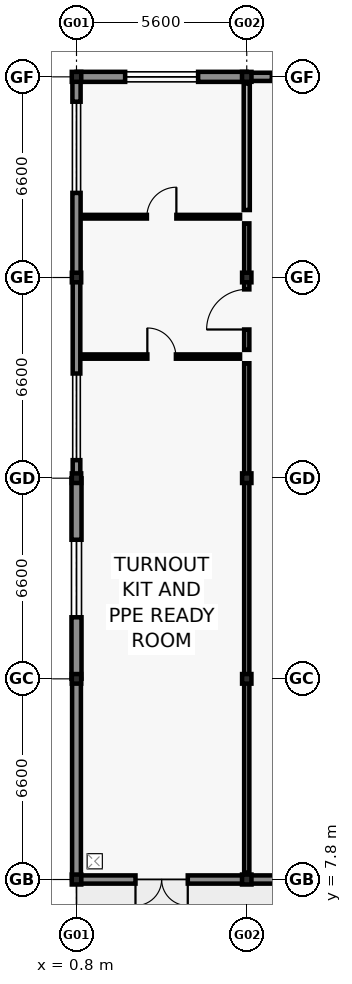
"""IFC4 building model, lengths in metres.
Left out: names, types, materials, properties, quantities, classifications, styles, units other than length and angle.
Written with IfcOpenShell. Run it as: python <this file> out.ifc"""

import sys

from ifc_helpers import new_model, si_unit, direction, frame, frame_2d, origin, origin_2d, place, context, subcontext, project, spatial, rectangle, i_section, extrude, element, fill, save


model = new_model("IFC4")
c1 = context("Model", 3, precision=1e-05, world=origin(), true_north=direction((0.0, 1.0)))
c2 = subcontext(c1, "Body", "Model", "MODEL_VIEW")
j1 = project(units=[si_unit("LENGTHUNIT", "METRE"), si_unit("PLANEANGLEUNIT", "RADIAN")], contexts=[c1])
p1 = place(None, origin())
s1 = spatial("IfcSite", under=j1, at=p1, CompositionType="ELEMENT")
p2 = place(p1, origin())
s2 = spatial("IfcBuilding", under=s1, at=p2, CompositionType="ELEMENT")
p3 = place(p2, origin())
s3 = spatial("IfcBuildingStorey", under=s2, at=p3, CompositionType="ELEMENT", Elevation=0.0)
p4 = place(p3, frame((0.8, 7.8, 0.0), z_axis=(0.0, 0.0, 1.0), x_axis=(1.0, 0.0, 0.0)))
e1 = element("IfcColumn", 1, at=p4, inside=s3, PredefinedType="COLUMN", context=c2, shape_type="SweptSolid", body=[
    extrude(i_section(OverallWidth=0.311, OverallDepth=0.327, WebThickness=0.016, FlangeThickness=0.025, FilletRadius=0.017, at=origin_2d()), origin(), (0.0, 0.0, 1.0), 5.4),
])
for number, where, z_axis, x_axis in (
    (2, (0.8, 14.4, 0.0), (0.0, 0.0, 1.0), (1.0, 0.0, 0.0)),
    (3, (0.8, 21.0, 0.0), (0.0, 0.0, 1.0), (1.0, 0.0, 0.0)),
    (4, (0.8, 27.6, 0.0), (0.0, 0.0, 1.0), (1.0, 0.0, 0.0)),
):
    element("IfcColumn", number, at=place(p3, frame(where, z_axis=z_axis, x_axis=x_axis)), inside=s3, PredefinedType="COLUMN", context=c2, shape_type="SweptSolid", body=[
        extrude(i_section(OverallWidth=0.307, OverallDepth=0.315, WebThickness=0.012, FlangeThickness=0.019, FilletRadius=0.017, at=origin_2d()), origin(), (0.0, 0.0, 1.0), 5.4),
    ])
for number, where, z_axis, x_axis in (
    (5, (0.8, 34.2, 0.0), (0.0, 0.0, 1.0), (1.0, 0.0, 0.0)),
    (6, (6.4, 7.8, 0.0), (0.0, 0.0, 1.0), (1.0, 0.0, 0.0)),
):
    element("IfcColumn", number, at=place(p3, frame(where, z_axis=z_axis, x_axis=x_axis)), inside=s3, PredefinedType="COLUMN", context=c2, shape_type="SweptSolid", body=[
        extrude(i_section(OverallWidth=0.311, OverallDepth=0.327, WebThickness=0.016, FlangeThickness=0.025, FilletRadius=0.017, at=origin_2d()), origin(), (0.0, 0.0, 1.0), 5.4),
    ])
for number, where, z_axis, x_axis in (
    (7, (6.4, 14.4, 0.0), (0.0, 0.0, 1.0), (1.0, 0.0, 0.0)),
    (8, (6.4, 21.0, 0.0), (0.0, 0.0, 1.0), (1.0, 0.0, 0.0)),
    (9, (6.4, 27.6, 0.0), (0.0, 0.0, 1.0), (1.0, 0.0, 0.0)),
):
    element("IfcColumn", number, at=place(p3, frame(where, z_axis=z_axis, x_axis=x_axis)), inside=s3, PredefinedType="COLUMN", context=c2, shape_type="SweptSolid", body=[
        extrude(i_section(OverallWidth=0.307, OverallDepth=0.315, WebThickness=0.012, FlangeThickness=0.019, FilletRadius=0.017, at=origin_2d()), origin(), (0.0, 0.0, 1.0), 5.4),
    ])
p5 = place(p3, frame((6.4, 34.2, 0.0), z_axis=(0.0, 0.0, 1.0), x_axis=(1.0, 0.0, 0.0)))
e10 = element("IfcColumn", 10, at=p5, inside=s3, PredefinedType="COLUMN", context=c2, shape_type="SweptSolid", body=[
    extrude(i_section(OverallWidth=0.311, OverallDepth=0.327, WebThickness=0.016, FlangeThickness=0.025, FilletRadius=0.017, at=origin_2d()), origin(), (0.0, 0.0, 1.0), 5.4),
])
p6 = place(p3, frame((6.395, 7.8, 0.0), z_axis=(0.0, 0.0, 1.0), x_axis=(-1.0, 0.0, 0.0)))
e11 = element("IfcWall", 11, at=p6, inside=s3, PredefinedType="SOLIDWALL", context=c2, shape_type="SweptSolid", body=[
    extrude(rectangle(XDim=5.59, YDim=0.27, at=frame_2d((2.795, 0.0))), origin(), (0.0, 0.0, 1.0), 4.52),
])
p7 = place(p6, frame((1.935, 0.0, 0.0)))
e12 = element("IfcOpeningElement", 12, at=p7, cuts=e11, PredefinedType="OPENING", context=c2, shape_type="SweptSolid", body=[
    extrude(rectangle(XDim=1.72, YDim=2.2, at=frame_2d((0.86, 1.1))), frame((0.0, 0.145, 0.0), z_axis=(0.0, -1.0, 0.0), x_axis=(1.0, 0.0, 0.0)), (0.0, 0.0, 1.0), 0.29),
])
p8 = place(p3, frame((11.995, 7.8, 0.0), z_axis=(0.0, 0.0, 1.0), x_axis=(-1.0, 0.0, 0.0)))
e13 = element("IfcWall", 13, at=p8, inside=s3, PredefinedType="SOLIDWALL", context=c2, shape_type="SweptSolid", body=[
    extrude(rectangle(XDim=5.59, YDim=0.27, at=frame_2d((2.795, 0.0))), origin(), (0.0, 0.0, 1.0), 4.3),
])
p9 = place(p8, frame((0.97, 0.0, 0.0)))
e14 = element("IfcOpeningElement", 14, at=p9, cuts=e13, PredefinedType="OPENING", context=c2, shape_type="SweptSolid", body=[
    extrude(rectangle(XDim=3.65, YDim=4.15, at=frame_2d((1.825, 2.075))), frame((0.0, 0.145, 0.0), z_axis=(0.0, -1.0, 0.0), x_axis=(1.0, 0.0, 0.0)), (0.0, 0.0, 1.0), 0.29),
])
p10 = place(p3, frame((0.805, 34.2, 0.0), z_axis=(0.0, 0.0, 1.0), x_axis=(1.0, 0.0, 0.0)))
e15 = element("IfcWall", 15, at=p10, inside=s3, PredefinedType="SOLIDWALL", context=c2, shape_type="SweptSolid", body=[
    extrude(rectangle(XDim=5.59, YDim=0.33, at=frame_2d((2.795, 0.0))), origin(), (0.0, 0.0, 1.0), 4.52),
])
p11 = place(p10, frame((1.595, 0.0, 0.8)))
e16 = element("IfcOpeningElement", 16, at=p11, cuts=e15, PredefinedType="OPENING", context=c2, shape_type="SweptSolid", body=[
    extrude(rectangle(XDim=2.4, YDim=2.1, at=frame_2d((1.2, 1.05))), frame((0.0, 0.175, 0.0), z_axis=(0.0, -1.0, 0.0), x_axis=(1.0, 0.0, 0.0)), (0.0, 0.0, 1.0), 0.35),
])
p12 = place(p3, frame((6.405, 34.2, 0.0), z_axis=(0.0, 0.0, 1.0), x_axis=(1.0, 0.0, 0.0)))
e17 = element("IfcWall", 17, at=p12, inside=s3, PredefinedType="SOLIDWALL", context=c2, shape_type="SweptSolid", body=[
    extrude(rectangle(XDim=5.59, YDim=0.27, at=frame_2d((2.795, 0.0))), origin(), (0.0, 0.0, 1.0), 4.3),
])
p13 = place(p12, frame((0.82, 0.0, 0.0)))
e18 = element("IfcOpeningElement", 18, at=p13, cuts=e17, PredefinedType="OPENING", context=c2, shape_type="SweptSolid", body=[
    extrude(rectangle(XDim=3.95, YDim=4.2, at=frame_2d((1.975, 2.1))), frame((0.0, 0.145, 0.0), z_axis=(0.0, -1.0, 0.0), x_axis=(1.0, 0.0, 0.0)), (0.0, 0.0, 1.0), 0.29),
])
p14 = place(p3, frame((0.8, 7.805, 0.0), z_axis=(0.0, 0.0, 1.0), x_axis=(0.0, 1.0, 0.0)))
e19 = element("IfcWall", 19, at=p14, inside=s3, PredefinedType="SOLIDWALL", context=c2, shape_type="SweptSolid", body=[
    extrude(rectangle(XDim=6.59, YDim=0.29, at=frame_2d((3.295, 0.0))), origin(), (0.0, 0.0, 1.0), 4.52),
])
p15 = place(p3, frame((0.8, 14.405, 0.0), z_axis=(0.0, 0.0, 1.0), x_axis=(0.0, 1.0, 0.0)))
e20 = element("IfcWall", 20, at=p15, inside=s3, PredefinedType="SOLIDWALL", context=c2, shape_type="SweptSolid", body=[
    extrude(rectangle(XDim=6.59, YDim=0.33, at=frame_2d((3.295, 0.0))), origin(), (0.0, 0.0, 1.0), 4.52),
])
p16 = place(p15, frame((2.02, 0.0, 0.8)))
e21 = element("IfcOpeningElement", 21, at=p16, cuts=e20, PredefinedType="OPENING", context=c2, shape_type="SweptSolid", body=[
    extrude(rectangle(XDim=2.55, YDim=2.1, at=frame_2d((1.275, 1.05))), frame((0.0, 0.175, 0.0), z_axis=(0.0, -1.0, 0.0), x_axis=(1.0, 0.0, 0.0)), (0.0, 0.0, 1.0), 0.35),
])
p17 = place(p3, frame((0.8, 21.005, 0.0), z_axis=(0.0, 0.0, 1.0), x_axis=(0.0, 1.0, 0.0)))
e22 = element("IfcWall", 22, at=p17, inside=s3, PredefinedType="SOLIDWALL", context=c2, shape_type="SweptSolid", body=[
    extrude(rectangle(XDim=6.59, YDim=0.25, at=frame_2d((3.295, 0.0))), origin(), (0.0, 0.0, 1.0), 4.52),
])
p18 = place(p17, frame((0.587, 0.0, 0.8)))
e23 = element("IfcOpeningElement", 23, at=p18, cuts=e22, PredefinedType="OPENING", context=c2, shape_type="SweptSolid", body=[
    extrude(rectangle(XDim=2.85, YDim=2.1, at=frame_2d((1.425, 1.05))), frame((0.0, 0.135, 0.0), z_axis=(0.0, -1.0, 0.0), x_axis=(1.0, 0.0, 0.0)), (0.0, 0.0, 1.0), 0.27),
])
p19 = place(p3, frame((0.8, 27.605, 0.0), z_axis=(0.0, 0.0, 1.0), x_axis=(0.0, 1.0, 0.0)))
e24 = element("IfcWall", 24, at=p19, inside=s3, PredefinedType="SOLIDWALL", context=c2, shape_type="SweptSolid", body=[
    extrude(rectangle(XDim=6.59, YDim=0.27, at=frame_2d((3.295, 0.0))), origin(), (0.0, 0.0, 1.0), 4.52),
])
p20 = place(p19, frame((2.778, 0.0, 0.8)))
e25 = element("IfcOpeningElement", 25, at=p20, cuts=e24, PredefinedType="OPENING", context=c2, shape_type="SweptSolid", body=[
    extrude(rectangle(XDim=3.0, YDim=2.1, at=frame_2d((1.5, 1.05))), frame((0.0, 0.145, 0.0), z_axis=(0.0, -1.0, 0.0), x_axis=(1.0, 0.0, 0.0)), (0.0, 0.0, 1.0), 0.29),
])
p21 = place(p3, frame((1.02, 25.0, 0.0), z_axis=(0.0, 0.0, 1.0), x_axis=(1.0, 0.0, 0.0)))
e26 = element("IfcWall", 26, at=p21, inside=s3, PredefinedType="PARTITIONING", context=c2, shape_type="SweptSolid", body=[
    extrude(rectangle(XDim=5.16, YDim=0.14, at=frame_2d((2.58, 0.0))), origin(), (0.0, 0.0, 1.0), 4.5),
])
p22 = place(p21, frame((2.11, 0.0, 0.0)))
e27 = element("IfcOpeningElement", 27, at=p22, cuts=e26, PredefinedType="OPENING", context=c2, shape_type="SweptSolid", body=[
    extrude(rectangle(XDim=0.94, YDim=2.08, at=frame_2d((0.47, 1.04))), frame((0.0, 0.08, 0.0), z_axis=(0.0, -1.0, 0.0), x_axis=(1.0, 0.0, 0.0)), (0.0, 0.0, 1.0), 0.16),
])
p23 = place(p3, frame((6.4, 8.02, 0.0), z_axis=(0.0, 0.0, 1.0), x_axis=(0.0, 1.0, 0.0)))
e28 = element("IfcWall", 28, at=p23, inside=s3, PredefinedType="PARTITIONING", context=c2, shape_type="SweptSolid", body=[
    extrude(rectangle(XDim=16.76, YDim=0.17, at=frame_2d((8.38, 0.0))), origin(), (0.0, 0.0, 1.0), 4.5),
])
p24 = place(p3, frame((1.02, 29.6, 0.0), z_axis=(0.0, 0.0, 1.0), x_axis=(1.0, 0.0, 0.0)))
e29 = element("IfcWall", 29, at=p24, inside=s3, PredefinedType="PARTITIONING", context=c2, shape_type="SweptSolid", body=[
    extrude(rectangle(XDim=5.16, YDim=0.12, at=frame_2d((2.58, 0.0))), origin(), (0.0, 0.0, 1.0), 4.5),
])
p25 = place(p24, frame((2.095, 0.0, 0.0)))
e30 = element("IfcOpeningElement", 30, at=p25, cuts=e29, PredefinedType="OPENING", context=c2, shape_type="SweptSolid", body=[
    extrude(rectangle(XDim=0.97, YDim=2.1, at=frame_2d((0.485, 1.05))), frame((0.0, 0.07, 0.0), z_axis=(0.0, -1.0, 0.0), x_axis=(1.0, 0.0, 0.0)), (0.0, 0.0, 1.0), 0.14),
])
p26 = place(p3, frame((6.4, 25.22, 0.0), z_axis=(0.0, 0.0, 1.0), x_axis=(0.0, 1.0, 0.0)))
e31 = element("IfcWall", 31, at=p26, inside=s3, PredefinedType="PARTITIONING", context=c2, shape_type="SweptSolid", body=[
    extrude(rectangle(XDim=4.16, YDim=0.17, at=frame_2d((2.08, 0.0))), origin(), (0.0, 0.0, 1.0), 4.5),
])
p27 = place(p26, frame((0.67, 0.0, 0.0)))
e32 = element("IfcOpeningElement", 32, at=p27, cuts=e31, PredefinedType="OPENING", context=c2, shape_type="SweptSolid", body=[
    extrude(rectangle(XDim=1.32, YDim=2.12, at=frame_2d((0.66, 1.06))), frame((0.0, 0.095, 0.0), z_axis=(0.0, -1.0, 0.0), x_axis=(1.0, 0.0, 0.0)), (0.0, 0.0, 1.0), 0.19),
])
p28 = place(p3, frame((6.4, 29.82, 0.0), z_axis=(0.0, 0.0, 1.0), x_axis=(0.0, 1.0, 0.0)))
e33 = element("IfcWall", 33, at=p28, inside=s3, PredefinedType="PARTITIONING", context=c2, shape_type="SweptSolid", body=[
    extrude(rectangle(XDim=4.16, YDim=0.2, at=frame_2d((2.08, 0.0))), origin(), (0.0, 0.0, 1.0), 4.5),
])
p29 = place(p7, origin())
e34 = element("IfcDoor", 34, at=p29, inside=s3, OperationType="DOUBLE_DOOR_SINGLE_SWING", PredefinedType="DOOR", context=c2, shape_type="SweptSolid", body=[
    extrude(rectangle(XDim=1.72, YDim=2.2, at=frame_2d((0.86, 1.1))), frame((0.0, 0.025, 0.0), z_axis=(0.0, -1.0, 0.0), x_axis=(1.0, 0.0, 0.0)), (0.0, 0.0, 1.0), 0.05),
])
fill(e12, e34)
p30 = place(p11, origin())
e35 = element("IfcWindow", 35, at=p30, inside=s3, PartitioningType="TRIPLE_PANEL_VERTICAL", PredefinedType="WINDOW", context=c2, shape_type="SweptSolid", body=[
    extrude(rectangle(XDim=2.4, YDim=2.1, at=frame_2d((1.2, 1.05))), frame((0.0, 0.03, 0.0), z_axis=(0.0, -1.0, 0.0), x_axis=(1.0, 0.0, 0.0)), (0.0, 0.0, 1.0), 0.06),
])
fill(e16, e35)
p31 = place(p16, origin())
e36 = element("IfcWindow", 36, at=p31, inside=s3, PartitioningType="TRIPLE_PANEL_VERTICAL", PredefinedType="WINDOW", context=c2, shape_type="SweptSolid", body=[
    extrude(rectangle(XDim=2.55, YDim=2.1, at=frame_2d((1.275, 1.05))), frame((0.0, 0.03, 0.0), z_axis=(0.0, -1.0, 0.0), x_axis=(1.0, 0.0, 0.0)), (0.0, 0.0, 1.0), 0.06),
])
fill(e21, e36)
p32 = place(p18, origin())
e37 = element("IfcWindow", 37, at=p32, inside=s3, PartitioningType="TRIPLE_PANEL_VERTICAL", PredefinedType="WINDOW", context=c2, shape_type="SweptSolid", body=[
    extrude(rectangle(XDim=2.85, YDim=2.1, at=frame_2d((1.425, 1.05))), frame((0.0, 0.03, 0.0), z_axis=(0.0, -1.0, 0.0), x_axis=(1.0, 0.0, 0.0)), (0.0, 0.0, 1.0), 0.06),
])
fill(e23, e37)
p33 = place(p20, origin())
e38 = element("IfcWindow", 38, at=p33, inside=s3, PartitioningType="TRIPLE_PANEL_VERTICAL", PredefinedType="WINDOW", context=c2, shape_type="SweptSolid", body=[
    extrude(rectangle(XDim=3.0, YDim=2.1, at=frame_2d((1.5, 1.05))), frame((0.0, 0.03, 0.0), z_axis=(0.0, -1.0, 0.0), x_axis=(1.0, 0.0, 0.0)), (0.0, 0.0, 1.0), 0.06),
])
fill(e25, e38)
p34 = place(p22, origin())
e39 = element("IfcDoor", 39, at=p34, inside=s3, OperationType="SINGLE_SWING_LEFT", PredefinedType="DOOR", context=c2, shape_type="SweptSolid", body=[
    extrude(rectangle(XDim=0.94, YDim=2.08, at=frame_2d((0.47, 1.04))), frame((0.0, 0.025, 0.0), z_axis=(0.0, -1.0, 0.0), x_axis=(1.0, 0.0, 0.0)), (0.0, 0.0, 1.0), 0.05),
])
fill(e27, e39)
p35 = place(p25, origin())
e40 = element("IfcDoor", 40, at=p35, inside=s3, OperationType="SINGLE_SWING_RIGHT", PredefinedType="DOOR", context=c2, shape_type="SweptSolid", body=[
    extrude(rectangle(XDim=0.97, YDim=2.1, at=frame_2d((0.485, 1.05))), frame((0.0, 0.025, 0.0), z_axis=(0.0, -1.0, 0.0), x_axis=(1.0, 0.0, 0.0)), (0.0, 0.0, 1.0), 0.05),
])
fill(e30, e40)
p36 = place(p27, origin())
e41 = element("IfcDoor", 41, at=p36, inside=s3, OperationType="SINGLE_SWING_LEFT", PredefinedType="DOOR", context=c2, shape_type="SweptSolid", body=[
    extrude(rectangle(XDim=1.32, YDim=2.12, at=frame_2d((0.66, 1.06))), frame((0.0, 0.025, 0.0), z_axis=(0.0, -1.0, 0.0), x_axis=(1.0, 0.0, 0.0)), (0.0, 0.0, 1.0), 0.05),
])
fill(e32, e41)
save(model, sys.argv[1])
